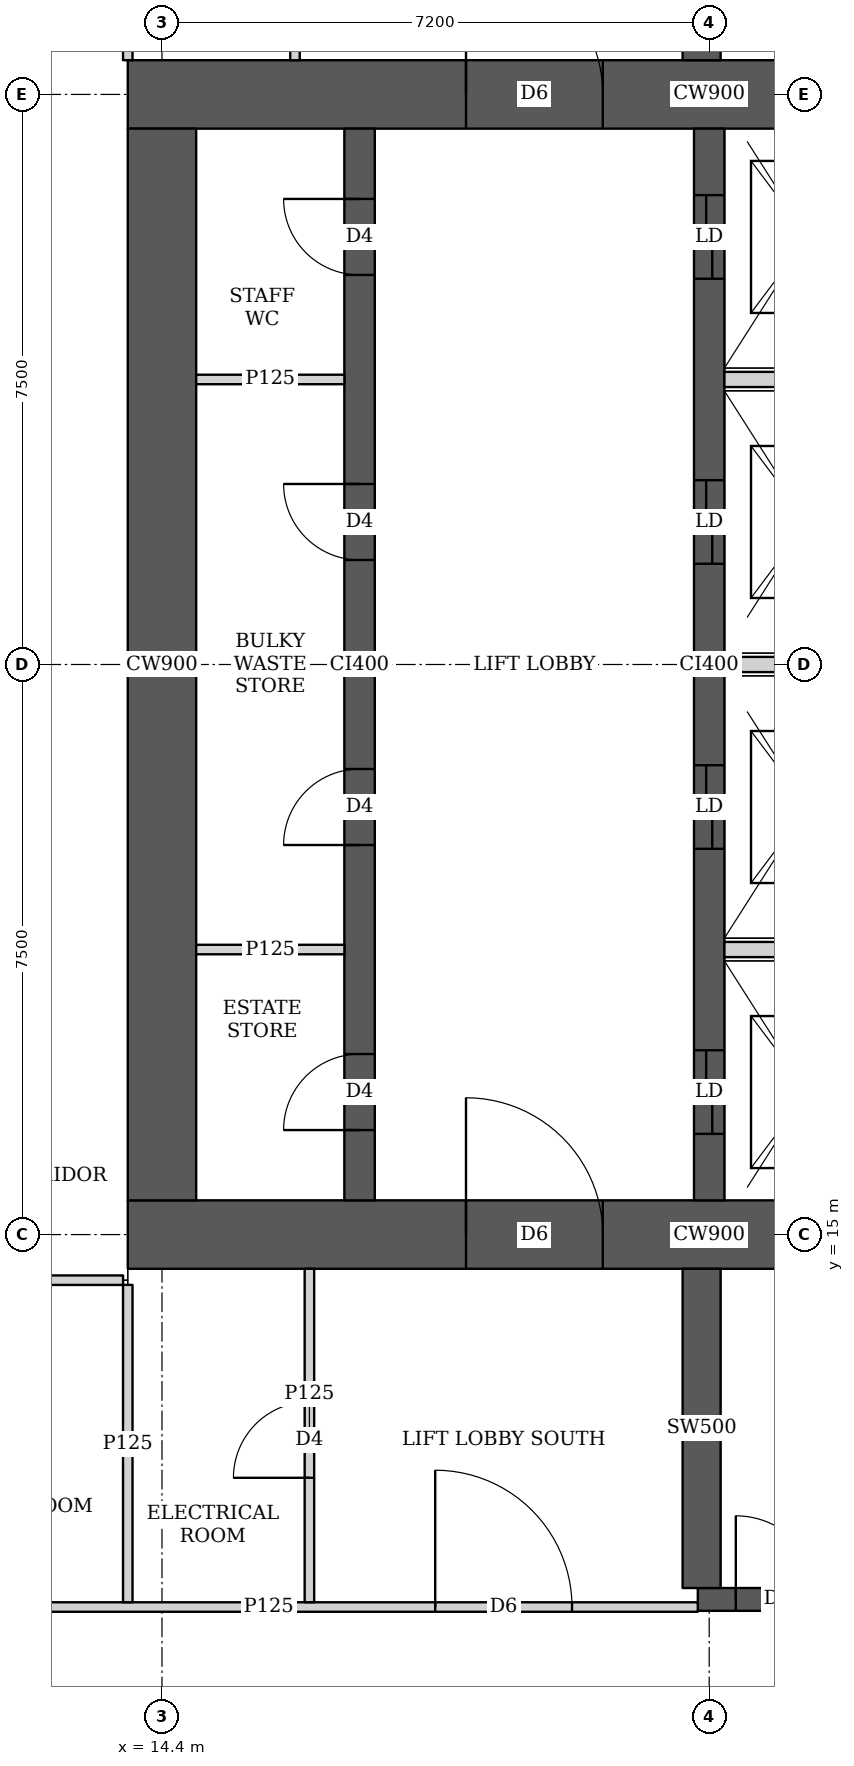
"""IFC4 building model, lengths in metres.
Left out: names, types, materials, properties, quantities, classifications, styles, units other than length and angle.
Written with IfcOpenShell. Run it as: python <this file> out.ifc"""

import sys

from ifc_helpers import new_model, si_unit, direction, frame, frame_2d, origin, place, context, subcontext, project, spatial, rectangle, extrude, element, fill, save


model = new_model("IFC4")
c1 = context("Model", 3, precision=1e-05, world=origin(), true_north=direction((0.0, 1.0)))
c2 = subcontext(c1, "Body", "Model", "MODEL_VIEW")
j1 = project(units=[si_unit("LENGTHUNIT", "METRE"), si_unit("PLANEANGLEUNIT", "RADIAN")], contexts=[c1])
p1 = place(None, origin())
s1 = spatial("IfcSite", under=j1, at=p1, CompositionType="ELEMENT")
p2 = place(p1, origin())
s2 = spatial("IfcBuilding", under=s1, at=p2, CompositionType="ELEMENT")
p3 = place(p2, frame((0.0, 0.0, 147.05)))
s3 = spatial("IfcBuildingStorey", under=s2, at=p3, CompositionType="ELEMENT", Elevation=147.05)
p4 = place(p3, frame((13.95, 15.0, 0.0), z_axis=(0.0, 0.0, 1.0), x_axis=(1.0, 0.0, 0.0)))
e1 = element("IfcWall", 1, at=p4, inside=s3, PredefinedType="SHEAR", context=c2, shape_type="SweptSolid", body=[
    extrude(rectangle(XDim=15.3, YDim=0.9, at=frame_2d((7.65, 0.0))), origin(), (0.0, 0.0, 1.0), 3.75),
])
p5 = place(p4, frame((4.45, 0.0, 0.0)))
e2 = element("IfcOpeningElement", 2, at=p5, cuts=e1, PredefinedType="OPENING", context=c2, shape_type="SweptSolid", body=[
    extrude(rectangle(XDim=1.8, YDim=2.1, at=frame_2d((0.9, 1.05))), frame((0.0, 0.46, 0.0), z_axis=(0.0, -1.0, 0.0), x_axis=(1.0, 0.0, 0.0)), (0.0, 0.0, 1.0), 0.92),
])
p6 = place(p4, frame((10.7, 0.0, 0.0)))
e3 = element("IfcOpeningElement", 3, at=p6, cuts=e1, PredefinedType="OPENING", context=c2, shape_type="SweptSolid", body=[
    extrude(rectangle(XDim=1.1, YDim=2.1, at=frame_2d((0.55, 1.05))), frame((0.0, 0.46, 0.0), z_axis=(0.0, -1.0, 0.0), x_axis=(1.0, 0.0, 0.0)), (0.0, 0.0, 1.0), 0.92),
])
p7 = place(p3, frame((13.95, 30.0, 0.0), z_axis=(0.0, 0.0, 1.0), x_axis=(1.0, 0.0, 0.0)))
e4 = element("IfcWall", 4, at=p7, inside=s3, PredefinedType="SHEAR", context=c2, shape_type="SweptSolid", body=[
    extrude(rectangle(XDim=15.3, YDim=0.9, at=frame_2d((7.65, 0.0))), origin(), (0.0, 0.0, 1.0), 3.75),
])
p8 = place(p7, frame((4.45, 0.0, 0.0)))
e5 = element("IfcOpeningElement", 5, at=p8, cuts=e4, PredefinedType="OPENING", context=c2, shape_type="SweptSolid", body=[
    extrude(rectangle(XDim=1.8, YDim=2.1, at=frame_2d((0.9, 1.05))), frame((0.0, 0.46, 0.0), z_axis=(0.0, -1.0, 0.0), x_axis=(1.0, 0.0, 0.0)), (0.0, 0.0, 1.0), 0.92),
])
p9 = place(p7, frame((10.7, 0.0, 0.0)))
e6 = element("IfcOpeningElement", 6, at=p9, cuts=e4, PredefinedType="OPENING", context=c2, shape_type="SweptSolid", body=[
    extrude(rectangle(XDim=1.1, YDim=2.1, at=frame_2d((0.55, 1.05))), frame((0.0, 0.46, 0.0), z_axis=(0.0, -1.0, 0.0), x_axis=(1.0, 0.0, 0.0)), (0.0, 0.0, 1.0), 0.92),
])
p10 = place(p3, frame((14.4, 15.45, 0.0), z_axis=(0.0, 0.0, 1.0), x_axis=(0.0, 1.0, 0.0)))
e7 = element("IfcWall", 7, at=p10, inside=s3, PredefinedType="SHEAR", context=c2, shape_type="SweptSolid", body=[
    extrude(rectangle(XDim=14.1, YDim=0.9, at=frame_2d((7.05, 0.0))), origin(), (0.0, 0.0, 1.0), 3.75),
])
p11 = place(p3, frame((17.0, 15.45, 0.0), z_axis=(0.0, 0.0, 1.0), x_axis=(0.0, 1.0, 0.0)))
e8 = element("IfcWall", 8, at=p11, inside=s3, PredefinedType="SHEAR", context=c2, shape_type="SweptSolid", body=[
    extrude(rectangle(XDim=14.1, YDim=0.4, at=frame_2d((7.05, 0.0))), origin(), (0.0, 0.0, 1.0), 3.75),
])
p12 = place(p11, frame((0.925, 0.0, 0.0)))
e9 = element("IfcOpeningElement", 9, at=p12, cuts=e8, PredefinedType="OPENING", context=c2, shape_type="SweptSolid", body=[
    extrude(rectangle(XDim=1.0, YDim=2.1, at=frame_2d((0.5, 1.05))), frame((0.0, 0.21, 0.0), z_axis=(0.0, -1.0, 0.0), x_axis=(1.0, 0.0, 0.0)), (0.0, 0.0, 1.0), 0.42),
])
p13 = place(p11, frame((4.675, 0.0, 0.0)))
e10 = element("IfcOpeningElement", 10, at=p13, cuts=e8, PredefinedType="OPENING", context=c2, shape_type="SweptSolid", body=[
    extrude(rectangle(XDim=1.0, YDim=2.1, at=frame_2d((0.5, 1.05))), frame((0.0, 0.21, 0.0), z_axis=(0.0, -1.0, 0.0), x_axis=(1.0, 0.0, 0.0)), (0.0, 0.0, 1.0), 0.42),
])
p14 = place(p11, frame((8.425, 0.0, 0.0)))
e11 = element("IfcOpeningElement", 11, at=p14, cuts=e8, PredefinedType="OPENING", context=c2, shape_type="SweptSolid", body=[
    extrude(rectangle(XDim=1.0, YDim=2.1, at=frame_2d((0.5, 1.05))), frame((0.0, 0.21, 0.0), z_axis=(0.0, -1.0, 0.0), x_axis=(1.0, 0.0, 0.0)), (0.0, 0.0, 1.0), 0.42),
])
p15 = place(p11, frame((12.175, 0.0, 0.0)))
e12 = element("IfcOpeningElement", 12, at=p15, cuts=e8, PredefinedType="OPENING", context=c2, shape_type="SweptSolid", body=[
    extrude(rectangle(XDim=1.0, YDim=2.1, at=frame_2d((0.5, 1.05))), frame((0.0, 0.21, 0.0), z_axis=(0.0, -1.0, 0.0), x_axis=(1.0, 0.0, 0.0)), (0.0, 0.0, 1.0), 0.42),
])
p16 = place(p3, frame((21.6, 15.45, 0.0), z_axis=(0.0, 0.0, 1.0), x_axis=(0.0, 1.0, 0.0)))
e13 = element("IfcWall", 13, at=p16, inside=s3, PredefinedType="SHEAR", context=c2, shape_type="SweptSolid", body=[
    extrude(rectangle(XDim=14.1, YDim=0.4, at=frame_2d((7.05, 0.0))), origin(), (0.0, 0.0, 1.0), 3.75),
])
p17 = place(p16, frame((0.875, 0.0, 0.0)))
e14 = element("IfcOpeningElement", 14, at=p17, cuts=e13, PredefinedType="OPENING", context=c2, shape_type="SweptSolid", body=[
    extrude(rectangle(XDim=1.1, YDim=2.1, at=frame_2d((0.55, 1.05))), frame((0.0, 0.21, 0.0), z_axis=(0.0, -1.0, 0.0), x_axis=(1.0, 0.0, 0.0)), (0.0, 0.0, 1.0), 0.42),
])
p18 = place(p16, frame((4.625, 0.0, 0.0)))
e15 = element("IfcOpeningElement", 15, at=p18, cuts=e13, PredefinedType="OPENING", context=c2, shape_type="SweptSolid", body=[
    extrude(rectangle(XDim=1.1, YDim=2.1, at=frame_2d((0.55, 1.05))), frame((0.0, 0.21, 0.0), z_axis=(0.0, -1.0, 0.0), x_axis=(1.0, 0.0, 0.0)), (0.0, 0.0, 1.0), 0.42),
])
p19 = place(p16, frame((8.375, 0.0, 0.0)))
e16 = element("IfcOpeningElement", 16, at=p19, cuts=e13, PredefinedType="OPENING", context=c2, shape_type="SweptSolid", body=[
    extrude(rectangle(XDim=1.1, YDim=2.1, at=frame_2d((0.55, 1.05))), frame((0.0, 0.21, 0.0), z_axis=(0.0, -1.0, 0.0), x_axis=(1.0, 0.0, 0.0)), (0.0, 0.0, 1.0), 0.42),
])
p20 = place(p16, frame((12.125, 0.0, 0.0)))
e17 = element("IfcOpeningElement", 17, at=p20, cuts=e13, PredefinedType="OPENING", context=c2, shape_type="SweptSolid", body=[
    extrude(rectangle(XDim=1.1, YDim=2.1, at=frame_2d((0.55, 1.05))), frame((0.0, 0.21, 0.0), z_axis=(0.0, -1.0, 0.0), x_axis=(1.0, 0.0, 0.0)), (0.0, 0.0, 1.0), 0.42),
])
p21 = place(p3, frame((21.45, 10.2, 0.0), z_axis=(0.0, 0.0, 1.0), x_axis=(1.0, 0.0, 0.0)))
e18 = element("IfcWall", 18, at=p21, inside=s3, PredefinedType="SHEAR", context=c2, shape_type="SweptSolid", body=[
    extrude(rectangle(XDim=7.5, YDim=0.3, at=frame_2d((3.75, 0.0))), origin(), (0.0, 0.0, 1.0), 3.75),
])
p22 = place(p21, frame((0.5, 0.0, 0.0)))
e19 = element("IfcOpeningElement", 19, at=p22, cuts=e18, PredefinedType="OPENING", context=c2, shape_type="SweptSolid", body=[
    extrude(rectangle(XDim=1.1, YDim=2.1, at=frame_2d((0.55, 1.05))), frame((0.0, 0.16, 0.0), z_axis=(0.0, -1.0, 0.0), x_axis=(1.0, 0.0, 0.0)), (0.0, 0.0, 1.0), 0.32),
])
for number, where, z_axis, x_axis in (
    (20, (21.5, 10.35, 0.0), (0.0, 0.0, 1.0), (0.0, 1.0, 0.0)),
    (21, (21.5, 30.45, 0.0), (0.0, 0.0, 1.0), (0.0, 1.0, 0.0)),
):
    element("IfcWall", number, at=place(p3, frame(where, z_axis=z_axis, x_axis=x_axis)), inside=s3, PredefinedType="SHEAR", context=c2, shape_type="SweptSolid", body=[
        extrude(rectangle(XDim=4.2, YDim=0.5, at=frame_2d((2.1, 0.0))), origin(), (0.0, 0.0, 1.0), 3.75),
    ])
p23 = place(p3, frame((10.162, 14.4, 0.0), z_axis=(0.0, 0.0, 1.0), x_axis=(1.0, 0.0, 0.0)))
e22 = element("IfcWall", 22, at=p23, inside=s3, PredefinedType="PARTITIONING", context=c2, shape_type="SweptSolid", body=[
    extrude(rectangle(XDim=3.726, YDim=0.125, at=frame_2d((1.863, 0.0))), origin(), (0.0, 0.0, 1.0), 3.5),
])
p24 = place(p3, frame((13.95, 10.163, 0.0), z_axis=(0.0, 0.0, 1.0), x_axis=(0.0, 1.0, 0.0)))
e23 = element("IfcWall", 23, at=p24, inside=s3, PredefinedType="PARTITIONING", context=c2, shape_type="SweptSolid", body=[
    extrude(rectangle(XDim=4.175, YDim=0.125, at=frame_2d((2.087, 0.0))), origin(), (0.0, 0.0, 1.0), 3.5),
])
p25 = place(p3, frame((13.95, 30.45, 0.0), z_axis=(0.0, 0.0, 1.0), x_axis=(0.0, 1.0, 0.0)))
e24 = element("IfcWall", 24, at=p25, inside=s3, PredefinedType="PARTITIONING", context=c2, shape_type="SweptSolid", body=[
    extrude(rectangle(XDim=4.387, YDim=0.125, at=frame_2d((2.193, 0.0))), origin(), (0.0, 0.0, 1.0), 3.5),
])
p26 = place(p3, frame((10.162, 10.1, 0.0), z_axis=(0.0, 0.0, 1.0), x_axis=(1.0, 0.0, 0.0)))
e25 = element("IfcWall", 25, at=p26, inside=s3, PredefinedType="PARTITIONING", context=c2, shape_type="SweptSolid", body=[
    extrude(rectangle(XDim=11.288, YDim=0.125, at=frame_2d((5.644, 0.0))), origin(), (0.0, 0.0, 1.0), 3.5),
])
p27 = place(p26, frame((7.833, 0.0, 0.0)))
e26 = element("IfcOpeningElement", 26, at=p27, cuts=e25, PredefinedType="OPENING", context=c2, shape_type="SweptSolid", body=[
    extrude(rectangle(XDim=1.8, YDim=2.1, at=frame_2d((0.9, 1.05))), frame((0.0, 0.073, 0.0), z_axis=(0.0, -1.0, 0.0), x_axis=(1.0, 0.0, 0.0)), (0.0, 0.0, 1.0), 0.145),
])
p28 = place(p3, frame((16.34, 10.163, 0.0), z_axis=(0.0, 0.0, 1.0), x_axis=(0.0, 1.0, 0.0)))
e27 = element("IfcWall", 27, at=p28, inside=s3, PredefinedType="PARTITIONING", context=c2, shape_type="SweptSolid", body=[
    extrude(rectangle(XDim=4.387, YDim=0.125, at=frame_2d((2.193, 0.0))), origin(), (0.0, 0.0, 1.0), 3.5),
])
p29 = place(p28, frame((1.637, 0.0, 0.0)))
e28 = element("IfcOpeningElement", 28, at=p29, cuts=e27, PredefinedType="OPENING", context=c2, shape_type="SweptSolid", body=[
    extrude(rectangle(XDim=1.0, YDim=2.1, at=frame_2d((0.5, 1.05))), frame((0.0, 0.073, 0.0), z_axis=(0.0, -1.0, 0.0), x_axis=(1.0, 0.0, 0.0)), (0.0, 0.0, 1.0), 0.145),
])
p30 = place(p3, frame((16.15, 30.45, 0.0), z_axis=(0.0, 0.0, 1.0), x_axis=(0.0, 1.0, 0.0)))
e29 = element("IfcWall", 29, at=p30, inside=s3, PredefinedType="PARTITIONING", context=c2, shape_type="SweptSolid", body=[
    extrude(rectangle(XDim=4.387, YDim=0.125, at=frame_2d((2.193, 0.0))), origin(), (0.0, 0.0, 1.0), 3.5),
])
p31 = place(p30, frame((1.75, 0.0, 0.0)))
e30 = element("IfcOpeningElement", 30, at=p31, cuts=e29, PredefinedType="OPENING", context=c2, shape_type="SweptSolid", body=[
    extrude(rectangle(XDim=1.0, YDim=2.1, at=frame_2d((0.5, 1.05))), frame((0.0, 0.073, 0.0), z_axis=(0.0, -1.0, 0.0), x_axis=(1.0, 0.0, 0.0)), (0.0, 0.0, 1.0), 0.145),
])
for number, where, z_axis, x_axis in (
    (31, (14.85, 18.75, 0.0), (0.0, 0.0, 1.0), (1.0, 0.0, 0.0)),
    (32, (14.85, 26.25, 0.0), (0.0, 0.0, 1.0), (1.0, 0.0, 0.0)),
):
    element("IfcWall", number, at=place(p3, frame(where, z_axis=z_axis, x_axis=x_axis)), inside=s3, PredefinedType="PARTITIONING", context=c2, shape_type="SweptSolid", body=[
        extrude(rectangle(XDim=1.95, YDim=0.125, at=frame_2d((0.975, 0.0))), origin(), (0.0, 0.0, 1.0), 3.5),
    ])
for number, where, z_axis, x_axis in (
    (33, (21.8, 18.75, 0.0), (0.0, 0.0, 1.0), (1.0, 0.0, 0.0)),
    (34, (21.8, 22.5, 0.0), (0.0, 0.0, 1.0), (1.0, 0.0, 0.0)),
    (35, (21.8, 26.25, 0.0), (0.0, 0.0, 1.0), (1.0, 0.0, 0.0)),
):
    element("IfcWall", number, at=place(p3, frame(where, z_axis=z_axis, x_axis=x_axis)), inside=s3, PredefinedType="SOLIDWALL", context=c2, shape_type="SweptSolid", body=[
        extrude(rectangle(XDim=2.2, YDim=0.2, at=frame_2d((1.1, 0.0))), origin(), (0.0, 0.0, 1.0), 3.5),
    ])
p32 = place(p29, origin())
e36 = element("IfcDoor", 36, at=p32, inside=s3, OperationType="SINGLE_SWING_LEFT", PredefinedType="DOOR", context=c2, shape_type="SweptSolid", body=[
    extrude(rectangle(XDim=1.0, YDim=2.1, at=frame_2d((0.5, 1.05))), frame((0.0, 0.025, 0.0), z_axis=(0.0, -1.0, 0.0), x_axis=(1.0, 0.0, 0.0)), (0.0, 0.0, 1.0), 0.05),
])
fill(e28, e36)
p33 = place(p27, origin())
e37 = element("IfcDoor", 37, at=p33, inside=s3, OperationType="DOUBLE_DOOR_SINGLE_SWING", PredefinedType="DOOR", context=c2, shape_type="SweptSolid", body=[
    extrude(rectangle(XDim=1.8, YDim=2.1, at=frame_2d((0.9, 1.05))), frame((0.0, 0.025, 0.0), z_axis=(0.0, -1.0, 0.0), x_axis=(1.0, 0.0, 0.0)), (0.0, 0.0, 1.0), 0.05),
])
fill(e26, e37)
p34 = place(p12, origin())
e38 = element("IfcDoor", 38, at=p34, inside=s3, OperationType="SINGLE_SWING_LEFT", PredefinedType="DOOR", context=c2, shape_type="SweptSolid", body=[
    extrude(rectangle(XDim=1.0, YDim=2.1, at=frame_2d((0.5, 1.05))), frame((0.0, 0.025, 0.0), z_axis=(0.0, -1.0, 0.0), x_axis=(1.0, 0.0, 0.0)), (0.0, 0.0, 1.0), 0.05),
])
fill(e9, e38)
p35 = place(p13, origin())
e39 = element("IfcDoor", 39, at=p35, inside=s3, OperationType="SINGLE_SWING_LEFT", PredefinedType="DOOR", context=c2, shape_type="SweptSolid", body=[
    extrude(rectangle(XDim=1.0, YDim=2.1, at=frame_2d((0.5, 1.05))), frame((0.0, 0.025, 0.0), z_axis=(0.0, -1.0, 0.0), x_axis=(1.0, 0.0, 0.0)), (0.0, 0.0, 1.0), 0.05),
])
fill(e10, e39)
p36 = place(p14, origin())
e40 = element("IfcDoor", 40, at=p36, inside=s3, OperationType="SINGLE_SWING_RIGHT", PredefinedType="DOOR", context=c2, shape_type="SweptSolid", body=[
    extrude(rectangle(XDim=1.0, YDim=2.1, at=frame_2d((0.5, 1.05))), frame((0.0, 0.025, 0.0), z_axis=(0.0, -1.0, 0.0), x_axis=(1.0, 0.0, 0.0)), (0.0, 0.0, 1.0), 0.05),
])
fill(e11, e40)
p37 = place(p15, origin())
e41 = element("IfcDoor", 41, at=p37, inside=s3, OperationType="SINGLE_SWING_RIGHT", PredefinedType="DOOR", context=c2, shape_type="SweptSolid", body=[
    extrude(rectangle(XDim=1.0, YDim=2.1, at=frame_2d((0.5, 1.05))), frame((0.0, 0.025, 0.0), z_axis=(0.0, -1.0, 0.0), x_axis=(1.0, 0.0, 0.0)), (0.0, 0.0, 1.0), 0.05),
])
fill(e12, e41)
p38 = place(p5, origin())
e42 = element("IfcDoor", 42, at=p38, inside=s3, OperationType="DOUBLE_DOOR_SINGLE_SWING", PredefinedType="DOOR", context=c2, shape_type="SweptSolid", body=[
    extrude(rectangle(XDim=1.8, YDim=2.1, at=frame_2d((0.9, 1.05))), frame((0.0, 0.025, 0.0), z_axis=(0.0, -1.0, 0.0), x_axis=(1.0, 0.0, 0.0)), (0.0, 0.0, 1.0), 0.05),
])
fill(e2, e42)
p39 = place(p8, origin())
e43 = element("IfcDoor", 43, at=p39, inside=s3, OperationType="DOUBLE_DOOR_SINGLE_SWING", PredefinedType="DOOR", context=c2, shape_type="SweptSolid", body=[
    extrude(rectangle(XDim=1.8, YDim=2.1, at=frame_2d((0.9, 1.05))), frame((0.0, 0.025, 0.0), z_axis=(0.0, -1.0, 0.0), x_axis=(1.0, 0.0, 0.0)), (0.0, 0.0, 1.0), 0.05),
])
fill(e5, e43)
p40 = place(p17, origin())
e44 = element("IfcDoor", 44, at=p40, inside=s3, OperationType="DOUBLE_DOOR_SLIDING", PredefinedType="DOOR", context=c2, shape_type="SweptSolid", body=[
    extrude(rectangle(XDim=1.1, YDim=2.1, at=frame_2d((0.55, 1.05))), frame((0.0, 0.025, 0.0), z_axis=(0.0, -1.0, 0.0), x_axis=(1.0, 0.0, 0.0)), (0.0, 0.0, 1.0), 0.05),
])
fill(e14, e44)
p41 = place(p18, origin())
e45 = element("IfcDoor", 45, at=p41, inside=s3, OperationType="DOUBLE_DOOR_SLIDING", PredefinedType="DOOR", context=c2, shape_type="SweptSolid", body=[
    extrude(rectangle(XDim=1.1, YDim=2.1, at=frame_2d((0.55, 1.05))), frame((0.0, 0.025, 0.0), z_axis=(0.0, -1.0, 0.0), x_axis=(1.0, 0.0, 0.0)), (0.0, 0.0, 1.0), 0.05),
])
fill(e15, e45)
p42 = place(p19, origin())
e46 = element("IfcDoor", 46, at=p42, inside=s3, OperationType="DOUBLE_DOOR_SLIDING", PredefinedType="DOOR", context=c2, shape_type="SweptSolid", body=[
    extrude(rectangle(XDim=1.1, YDim=2.1, at=frame_2d((0.55, 1.05))), frame((0.0, 0.025, 0.0), z_axis=(0.0, -1.0, 0.0), x_axis=(1.0, 0.0, 0.0)), (0.0, 0.0, 1.0), 0.05),
])
fill(e16, e46)
p43 = place(p20, origin())
e47 = element("IfcDoor", 47, at=p43, inside=s3, OperationType="DOUBLE_DOOR_SLIDING", PredefinedType="DOOR", context=c2, shape_type="SweptSolid", body=[
    extrude(rectangle(XDim=1.1, YDim=2.1, at=frame_2d((0.55, 1.05))), frame((0.0, 0.025, 0.0), z_axis=(0.0, -1.0, 0.0), x_axis=(1.0, 0.0, 0.0)), (0.0, 0.0, 1.0), 0.05),
])
fill(e17, e47)
p44 = place(p22, origin())
e48 = element("IfcDoor", 48, at=p44, inside=s3, OperationType="SINGLE_SWING_LEFT", PredefinedType="DOOR", context=c2, shape_type="SweptSolid", body=[
    extrude(rectangle(XDim=1.1, YDim=2.1, at=frame_2d((0.55, 1.05))), frame((0.0, 0.025, 0.0), z_axis=(0.0, -1.0, 0.0), x_axis=(1.0, 0.0, 0.0)), (0.0, 0.0, 1.0), 0.05),
])
fill(e19, e48)
save(model, sys.argv[1])
